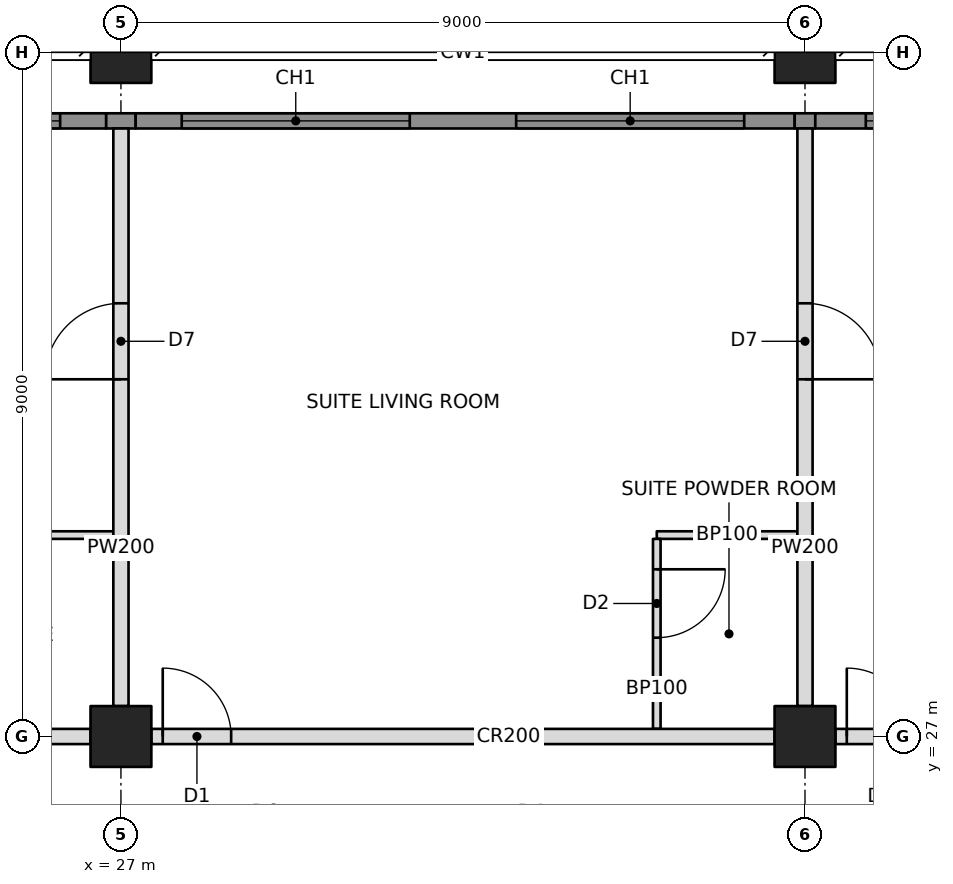
"""IFC4 building model, lengths in metres.
Left out: names, types, materials, properties, quantities, classifications, styles, units other than length and angle.
Written with IfcOpenShell. Run it as: python <this file> out.ifc"""

import sys

from ifc_helpers import new_model, si_unit, direction, frame, frame_2d, origin, origin_2d, place, context, subcontext, project, spatial, rectangle, hollow_rectangle, extrude, element, fill, save


model = new_model("IFC4")
c1 = context("Model", 3, precision=1e-05, world=origin(), true_north=direction((0.0, 1.0)))
c2 = subcontext(c1, "Body", "Model", "MODEL_VIEW")
j1 = project(units=[si_unit("LENGTHUNIT", "METRE"), si_unit("PLANEANGLEUNIT", "RADIAN")], contexts=[c1])
p1 = place(None, origin())
s1 = spatial("IfcSite", under=j1, at=p1, CompositionType="ELEMENT")
p2 = place(p1, origin())
s2 = spatial("IfcBuilding", under=s1, at=p2, CompositionType="ELEMENT")
p3 = place(p2, frame((0.0, 0.0, 28.0)))
s3 = spatial("IfcBuildingStorey", under=s2, at=p3, CompositionType="ELEMENT", Elevation=28.0)
for number, where, z_axis, x_axis in (
    (1, (27.0, 27.0, 0.0), (0.0, 0.0, 1.0), (1.0, 0.0, 0.0)),
    (2, (27.0, 36.0, 0.0), (0.0, 0.0, 1.0), (1.0, 0.0, 0.0)),
    (3, (36.0, 27.0, 0.0), (0.0, 0.0, 1.0), (1.0, 0.0, 0.0)),
    (4, (36.0, 36.0, 0.0), (0.0, 0.0, 1.0), (1.0, 0.0, 0.0)),
):
    element("IfcColumn", number, at=place(p3, frame(where, z_axis=z_axis, x_axis=x_axis)), inside=s3, PredefinedType="COLUMN", context=c2, shape_type="SweptSolid", body=[
        extrude(hollow_rectangle(XDim=0.8, YDim=0.8, WallThickness=0.1, at=origin_2d()), origin(), (0.0, 0.0, 1.0), 3.4),
    ])
p4 = place(p3, frame((18.4, 27.0, 0.0), z_axis=(0.0, 0.0, 1.0), x_axis=(1.0, 0.0, 0.0)))
e5 = element("IfcWall", 5, at=p4, inside=s3, PredefinedType="PARTITIONING", context=c2, shape_type="SweptSolid", body=[
    extrude(rectangle(XDim=8.2, YDim=0.2, at=frame_2d((4.1, 0.0))), origin(), (0.0, 0.0, 1.0), 2.405),
])
p5 = place(p4, frame((0.15, 0.0, 0.0)))
e6 = element("IfcOpeningElement", 6, at=p5, cuts=e5, PredefinedType="OPENING", context=c2, shape_type="SweptSolid", body=[
    extrude(rectangle(XDim=0.9, YDim=2.1, at=frame_2d((0.45, 1.05))), frame((0.0, 0.11, 0.0), z_axis=(0.0, -1.0, 0.0), x_axis=(1.0, 0.0, 0.0)), (0.0, 0.0, 1.0), 0.22),
])
p6 = place(p3, frame((27.4, 27.0, 0.0), z_axis=(0.0, 0.0, 1.0), x_axis=(1.0, 0.0, 0.0)))
e7 = element("IfcWall", 7, at=p6, inside=s3, PredefinedType="PARTITIONING", context=c2, shape_type="SweptSolid", body=[
    extrude(rectangle(XDim=8.2, YDim=0.2, at=frame_2d((4.1, 0.0))), origin(), (0.0, 0.0, 1.0), 2.405),
])
p7 = place(p6, frame((0.15, 0.0, 0.0)))
e8 = element("IfcOpeningElement", 8, at=p7, cuts=e7, PredefinedType="OPENING", context=c2, shape_type="SweptSolid", body=[
    extrude(rectangle(XDim=0.9, YDim=2.1, at=frame_2d((0.45, 1.05))), frame((0.0, 0.11, 0.0), z_axis=(0.0, -1.0, 0.0), x_axis=(1.0, 0.0, 0.0)), (0.0, 0.0, 1.0), 0.22),
])
p8 = place(p3, frame((36.4, 27.0, 0.0), z_axis=(0.0, 0.0, 1.0), x_axis=(1.0, 0.0, 0.0)))
e9 = element("IfcWall", 9, at=p8, inside=s3, PredefinedType="PARTITIONING", context=c2, shape_type="SweptSolid", body=[
    extrude(rectangle(XDim=8.2, YDim=0.2, at=frame_2d((4.1, 0.0))), origin(), (0.0, 0.0, 1.0), 2.438),
])
p9 = place(p8, frame((0.15, 0.0, 0.0)))
e10 = element("IfcOpeningElement", 10, at=p9, cuts=e9, PredefinedType="OPENING", context=c2, shape_type="SweptSolid", body=[
    extrude(rectangle(XDim=0.9, YDim=2.1, at=frame_2d((0.45, 1.05))), frame((0.0, 0.11, 0.0), z_axis=(0.0, -1.0, 0.0), x_axis=(1.0, 0.0, 0.0)), (0.0, 0.0, 1.0), 0.22),
])
p10 = place(p3, frame((27.0, 27.4, 0.0), z_axis=(0.0, 0.0, 1.0), x_axis=(0.0, 1.0, 0.0)))
e11 = element("IfcWall", 11, at=p10, inside=s3, PredefinedType="PARTITIONING", context=c2, shape_type="SweptSolid", body=[
    extrude(rectangle(XDim=7.6, YDim=0.2, at=frame_2d((3.8, 0.0))), origin(), (0.0, 0.0, 1.0), 2.405),
])
p11 = place(p10, frame((4.3, 0.0, 0.0)))
e12 = element("IfcOpeningElement", 12, at=p11, cuts=e11, PredefinedType="OPENING", context=c2, shape_type="SweptSolid", body=[
    extrude(rectangle(XDim=1.0, YDim=2.1, at=frame_2d((0.5, 1.05))), frame((0.0, 0.11, 0.0), z_axis=(0.0, -1.0, 0.0), x_axis=(1.0, 0.0, 0.0)), (0.0, 0.0, 1.0), 0.22),
])
p12 = place(p3, frame((36.0, 27.4, 0.0), z_axis=(0.0, 0.0, 1.0), x_axis=(0.0, 1.0, 0.0)))
e13 = element("IfcWall", 13, at=p12, inside=s3, PredefinedType="PARTITIONING", context=c2, shape_type="SweptSolid", body=[
    extrude(rectangle(XDim=7.6, YDim=0.2, at=frame_2d((3.8, 0.0))), origin(), (0.0, 0.0, 1.0), 2.438),
])
p13 = place(p12, frame((4.3, 0.0, 0.0)))
e14 = element("IfcOpeningElement", 14, at=p13, cuts=e13, PredefinedType="OPENING", context=c2, shape_type="SweptSolid", body=[
    extrude(rectangle(XDim=1.0, YDim=2.1, at=frame_2d((0.5, 1.05))), frame((0.0, 0.11, 0.0), z_axis=(0.0, -1.0, 0.0), x_axis=(1.0, 0.0, 0.0)), (0.0, 0.0, 1.0), 0.22),
])
p14 = place(p3, frame((23.45, 29.65, 0.0), z_axis=(0.0, 0.0, 1.0), x_axis=(1.0, 0.0, 0.0)))
e15 = element("IfcWall", 15, at=p14, inside=s3, PredefinedType="PARTITIONING", context=c2, shape_type="SweptSolid", body=[
    extrude(rectangle(XDim=3.45, YDim=0.1, at=frame_2d((1.725, 0.0))), origin(), (0.0, 0.0, 1.0), 2.404),
])
p15 = place(p3, frame((34.05, 29.65, 0.0), z_axis=(0.0, 0.0, 1.0), x_axis=(1.0, 0.0, 0.0)))
e16 = element("IfcWall", 16, at=p15, inside=s3, PredefinedType="PARTITIONING", context=c2, shape_type="SweptSolid", body=[
    extrude(rectangle(XDim=1.85, YDim=0.1, at=frame_2d((0.925, 0.0))), origin(), (0.0, 0.0, 1.0), 2.438),
])
p16 = place(p3, frame((34.05, 27.1, 0.0), z_axis=(0.0, 0.0, 1.0), x_axis=(0.0, 1.0, 0.0)))
e17 = element("IfcWall", 17, at=p16, inside=s3, PredefinedType="PARTITIONING", context=c2, shape_type="SweptSolid", body=[
    extrude(rectangle(XDim=2.5, YDim=0.1, at=frame_2d((1.25, 0.0))), origin(), (0.0, 0.0, 1.0), 2.404),
])
p17 = place(p16, frame((1.2, 0.0, 0.0)))
e18 = element("IfcOpeningElement", 18, at=p17, cuts=e17, PredefinedType="OPENING", context=c2, shape_type="SweptSolid", body=[
    extrude(rectangle(XDim=0.9, YDim=2.1, at=frame_2d((0.45, 1.05))), frame((0.0, 0.06, 0.0), z_axis=(0.0, -1.0, 0.0), x_axis=(1.0, 0.0, 0.0)), (0.0, 0.0, 1.0), 0.12),
])
p18 = place(p3, frame((18.194, 35.1, 0.0), z_axis=(0.0, 0.0, 1.0), x_axis=(1.0, 0.0, 0.0)))
e19 = element("IfcWall", 19, at=p18, inside=s3, PredefinedType="SOLIDWALL", context=c2, shape_type="SweptSolid", body=[
    extrude(rectangle(XDim=8.612, YDim=0.2, at=frame_2d((4.306, 0.0))), origin(), (0.0, 0.0, 1.0), 3.2),
])
p19 = place(p18, frame((0.606, 0.0, 0.6)))
e20 = element("IfcOpeningElement", 20, at=p19, cuts=e19, PredefinedType="OPENING", context=c2, shape_type="SweptSolid", body=[
    extrude(rectangle(XDim=3.0, YDim=2.2, at=frame_2d((1.5, 1.1))), frame((0.0, 0.11, 0.0), z_axis=(0.0, -1.0, 0.0), x_axis=(1.0, 0.0, 0.0)), (0.0, 0.0, 1.0), 0.22),
])
p20 = place(p18, frame((5.006, 0.0, 0.6)))
e21 = element("IfcOpeningElement", 21, at=p20, cuts=e19, PredefinedType="OPENING", context=c2, shape_type="SweptSolid", body=[
    extrude(rectangle(XDim=3.0, YDim=2.2, at=frame_2d((1.5, 1.1))), frame((0.0, 0.11, 0.0), z_axis=(0.0, -1.0, 0.0), x_axis=(1.0, 0.0, 0.0)), (0.0, 0.0, 1.0), 0.22),
])
p21 = place(p3, frame((26.806, 35.1, 0.0), z_axis=(0.0, 0.0, 1.0), x_axis=(1.0, 0.0, 0.0)))
e22 = element("IfcWall", 22, at=p21, inside=s3, PredefinedType="SOLIDWALL", context=c2, shape_type="SweptSolid", body=[
    extrude(rectangle(XDim=0.388, YDim=0.2, at=frame_2d((0.194, 0.0))), origin(), (0.0, 0.0, 1.0), 2.404),
])
p22 = place(p3, frame((27.194, 35.1, 0.0), z_axis=(0.0, 0.0, 1.0), x_axis=(1.0, 0.0, 0.0)))
e23 = element("IfcWall", 23, at=p22, inside=s3, PredefinedType="SOLIDWALL", context=c2, shape_type="SweptSolid", body=[
    extrude(rectangle(XDim=8.671, YDim=0.2, at=frame_2d((4.335, 0.0))), origin(), (0.0, 0.0, 1.0), 3.2),
])
p23 = place(p22, frame((0.606, 0.0, 0.6)))
e24 = element("IfcOpeningElement", 24, at=p23, cuts=e23, PredefinedType="OPENING", context=c2, shape_type="SweptSolid", body=[
    extrude(rectangle(XDim=3.0, YDim=2.2, at=frame_2d((1.5, 1.1))), frame((0.0, 0.11, 0.0), z_axis=(0.0, -1.0, 0.0), x_axis=(1.0, 0.0, 0.0)), (0.0, 0.0, 1.0), 0.22),
])
p24 = place(p22, frame((5.006, 0.0, 0.6)))
e25 = element("IfcOpeningElement", 25, at=p24, cuts=e23, PredefinedType="OPENING", context=c2, shape_type="SweptSolid", body=[
    extrude(rectangle(XDim=3.0, YDim=2.2, at=frame_2d((1.5, 1.1))), frame((0.0, 0.11, 0.0), z_axis=(0.0, -1.0, 0.0), x_axis=(1.0, 0.0, 0.0)), (0.0, 0.0, 1.0), 0.22),
])
p25 = place(p3, frame((35.865, 35.1, 0.0), z_axis=(0.0, 0.0, 1.0), x_axis=(1.0, 0.0, 0.0)))
e26 = element("IfcWall", 26, at=p25, inside=s3, PredefinedType="SOLIDWALL", context=c2, shape_type="SweptSolid", body=[
    extrude(rectangle(XDim=0.271, YDim=0.2, at=frame_2d((0.135, 0.0))), origin(), (0.0, 0.0, 1.0), 2.438),
])
p26 = place(p3, frame((36.135, 35.1, 0.0), z_axis=(0.0, 0.0, 1.0), x_axis=(1.0, 0.0, 0.0)))
e27 = element("IfcWall", 27, at=p26, inside=s3, PredefinedType="SOLIDWALL", context=c2, shape_type="SweptSolid", body=[
    extrude(rectangle(XDim=8.729, YDim=0.2, at=frame_2d((4.365, 0.0))), origin(), (0.0, 0.0, 1.0), 3.2),
])
p27 = place(p26, frame((0.665, 0.0, 0.6)))
e28 = element("IfcOpeningElement", 28, at=p27, cuts=e27, PredefinedType="OPENING", context=c2, shape_type="SweptSolid", body=[
    extrude(rectangle(XDim=3.0, YDim=2.2, at=frame_2d((1.5, 1.1))), frame((0.0, 0.11, 0.0), z_axis=(0.0, -1.0, 0.0), x_axis=(1.0, 0.0, 0.0)), (0.0, 0.0, 1.0), 0.22),
])
p28 = place(p26, frame((5.065, 0.0, 0.6)))
e29 = element("IfcOpeningElement", 29, at=p28, cuts=e27, PredefinedType="OPENING", context=c2, shape_type="SweptSolid", body=[
    extrude(rectangle(XDim=3.0, YDim=2.2, at=frame_2d((1.5, 1.1))), frame((0.0, 0.11, 0.0), z_axis=(0.0, -1.0, 0.0), x_axis=(1.0, 0.0, 0.0)), (0.0, 0.0, 1.0), 0.22),
])
p29 = place(p20, origin())
e30 = element("IfcWindow", 30, at=p29, inside=s3, PartitioningType="TRIPLE_PANEL_VERTICAL", PredefinedType="WINDOW", context=c2, shape_type="SweptSolid", body=[
    extrude(rectangle(XDim=3.0, YDim=2.2, at=frame_2d((1.5, 1.1))), frame((0.0, 0.03, 0.0), z_axis=(0.0, -1.0, 0.0), x_axis=(1.0, 0.0, 0.0)), (0.0, 0.0, 1.0), 0.06),
])
fill(e21, e30)
p30 = place(p23, origin())
e31 = element("IfcWindow", 31, at=p30, inside=s3, PartitioningType="TRIPLE_PANEL_VERTICAL", PredefinedType="WINDOW", context=c2, shape_type="SweptSolid", body=[
    extrude(rectangle(XDim=3.0, YDim=2.2, at=frame_2d((1.5, 1.1))), frame((0.0, 0.03, 0.0), z_axis=(0.0, -1.0, 0.0), x_axis=(1.0, 0.0, 0.0)), (0.0, 0.0, 1.0), 0.06),
])
fill(e24, e31)
p31 = place(p24, origin())
e32 = element("IfcWindow", 32, at=p31, inside=s3, PartitioningType="TRIPLE_PANEL_VERTICAL", PredefinedType="WINDOW", context=c2, shape_type="SweptSolid", body=[
    extrude(rectangle(XDim=3.0, YDim=2.2, at=frame_2d((1.5, 1.1))), frame((0.0, 0.03, 0.0), z_axis=(0.0, -1.0, 0.0), x_axis=(1.0, 0.0, 0.0)), (0.0, 0.0, 1.0), 0.06),
])
fill(e25, e32)
p32 = place(p27, origin())
e33 = element("IfcWindow", 33, at=p32, inside=s3, PartitioningType="TRIPLE_PANEL_VERTICAL", PredefinedType="WINDOW", context=c2, shape_type="SweptSolid", body=[
    extrude(rectangle(XDim=3.0, YDim=2.2, at=frame_2d((1.5, 1.1))), frame((0.0, 0.03, 0.0), z_axis=(0.0, -1.0, 0.0), x_axis=(1.0, 0.0, 0.0)), (0.0, 0.0, 1.0), 0.06),
])
fill(e28, e33)
p33 = place(p11, origin())
e34 = element("IfcDoor", 34, at=p33, inside=s3, OperationType="SINGLE_SWING_LEFT", PredefinedType="DOOR", context=c2, shape_type="SweptSolid", body=[
    extrude(rectangle(XDim=1.0, YDim=2.1, at=frame_2d((0.5, 1.05))), frame((0.0, 0.025, 0.0), z_axis=(0.0, -1.0, 0.0), x_axis=(1.0, 0.0, 0.0)), (0.0, 0.0, 1.0), 0.05),
])
fill(e12, e34)
p34 = place(p13, frame((1.0, 0.0, 0.0), z_axis=(0.0, 0.0, 1.0), x_axis=(-1.0, 0.0, 0.0)))
e35 = element("IfcDoor", 35, at=p34, inside=s3, OperationType="SINGLE_SWING_RIGHT", PredefinedType="DOOR", context=c2, shape_type="SweptSolid", body=[
    extrude(rectangle(XDim=1.0, YDim=2.1, at=frame_2d((0.5, 1.05))), frame((0.0, 0.025, 0.0), z_axis=(0.0, -1.0, 0.0), x_axis=(1.0, 0.0, 0.0)), (0.0, 0.0, 1.0), 0.05),
])
fill(e14, e35)
p35 = place(p17, frame((0.9, 0.0, 0.0), z_axis=(0.0, 0.0, 1.0), x_axis=(-1.0, 0.0, 0.0)))
e36 = element("IfcDoor", 36, at=p35, inside=s3, OperationType="SINGLE_SWING_LEFT", PredefinedType="DOOR", context=c2, shape_type="SweptSolid", body=[
    extrude(rectangle(XDim=0.9, YDim=2.1, at=frame_2d((0.45, 1.05))), frame((0.0, 0.025, 0.0), z_axis=(0.0, -1.0, 0.0), x_axis=(1.0, 0.0, 0.0)), (0.0, 0.0, 1.0), 0.05),
])
fill(e18, e36)
p36 = place(p7, origin())
e37 = element("IfcDoor", 37, at=p36, inside=s3, OperationType="SINGLE_SWING_LEFT", PredefinedType="DOOR", context=c2, shape_type="SweptSolid", body=[
    extrude(rectangle(XDim=0.9, YDim=2.1, at=frame_2d((0.45, 1.05))), frame((0.0, 0.025, 0.0), z_axis=(0.0, -1.0, 0.0), x_axis=(1.0, 0.0, 0.0)), (0.0, 0.0, 1.0), 0.05),
])
fill(e8, e37)
p37 = place(p9, origin())
e38 = element("IfcDoor", 38, at=p37, inside=s3, OperationType="SINGLE_SWING_LEFT", PredefinedType="DOOR", context=c2, shape_type="SweptSolid", body=[
    extrude(rectangle(XDim=0.9, YDim=2.1, at=frame_2d((0.45, 1.05))), frame((0.0, 0.025, 0.0), z_axis=(0.0, -1.0, 0.0), x_axis=(1.0, 0.0, 0.0)), (0.0, 0.0, 1.0), 0.05),
])
fill(e10, e38)
save(model, sys.argv[1])
